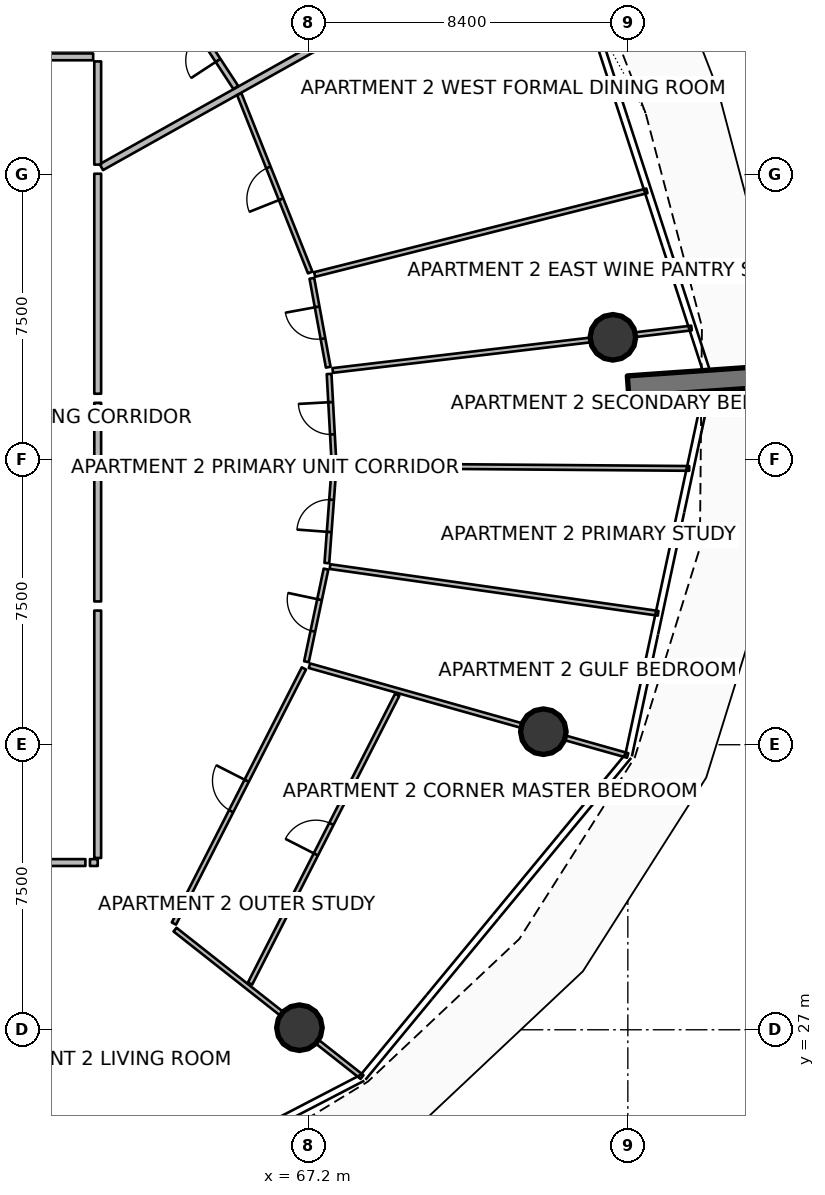
"""IFC4 building model, lengths in metres.
Left out: names, types, materials, properties, quantities, classifications, styles, units other than length and angle.
Written with IfcOpenShell. Run it as: python <this file> out.ifc"""

import sys

from ifc_helpers import new_model, si_unit, direction, frame, frame_2d, origin, origin_2d, place, context, subcontext, project, spatial, rectangle, circle, extrude, element, fill, save


model = new_model("IFC4")
c1 = context("Model", 3, precision=1e-05, world=origin(), true_north=direction((0.0, 1.0)))
c2 = subcontext(c1, "Body", "Model", "MODEL_VIEW")
j1 = project(units=[si_unit("LENGTHUNIT", "METRE"), si_unit("PLANEANGLEUNIT", "RADIAN")], contexts=[c1])
p1 = place(None, origin())
s1 = spatial("IfcSite", under=j1, at=p1, CompositionType="ELEMENT")
p2 = place(p1, origin())
s2 = spatial("IfcBuilding", under=s1, at=p2, CompositionType="ELEMENT")
p3 = place(p2, frame((0.0, 0.0, 75.15)))
s3 = spatial("IfcBuildingStorey", under=s2, at=p3, CompositionType="ELEMENT", Elevation=75.15)
p4 = place(p3, frame((75.606, 43.93, 0.0), z_axis=(0.0, 0.0, 1.0), x_axis=(0.997564163539, 0.069754853754, 0.0)))
e1 = element("IfcWall", 1, at=p4, inside=s3, PredefinedType="SOLIDWALL", context=c2, shape_type="SweptSolid", body=[
    extrude(rectangle(XDim=3.5, YDim=0.55, at=frame_2d((1.75, 0.0))), origin(), (0.0, 0.0, 1.0), 3.75),
])
for number, where, z_axis, x_axis in (
    (2, (66.958, 27.055, 0.0), (0.0, 0.0, 1.0), (1.0, 0.0, 0.0)),
    (3, (73.377, 34.843, 0.0), (0.0, 0.0, 1.0), (1.0, 0.0, 0.0)),
    (4, (75.207, 45.22, 0.0), (0.0, 0.0, 1.0), (1.0, 0.0, 0.0)),
):
    element("IfcColumn", number, at=place(p3, frame(where, z_axis=z_axis, x_axis=x_axis)), inside=s3, PredefinedType="COLUMN", context=c2, shape_type="SweptSolid", body=[
        extrude(circle(Radius=0.6, at=origin_2d()), origin(), (0.0, 0.0, 1.0), 3.5),
    ])
p5 = place(p3, frame((61.746, 49.698, 0.0), z_axis=(0.0, 0.0, 1.0), x_axis=(0.872489938668, 0.488632077256, 0.0)))
e5 = element("IfcWall", 5, at=p5, inside=s3, PredefinedType="PARTITIONING", context=c2, shape_type="SweptSolid", body=[
    extrude(rectangle(XDim=13.725, YDim=0.18, at=frame_2d((6.862, 0.0))), origin(), (0.0, 0.0, 1.0), 2.94),
])
p6 = place(p3, frame((61.65, 49.764, 0.0), z_axis=(0.0, 0.0, 1.0), x_axis=(0.0, 1.0, 0.0)))
e6 = element("IfcWall", 6, at=p6, inside=s3, PredefinedType="PARTITIONING", context=c2, shape_type="SweptSolid", body=[
    extrude(rectangle(XDim=2.716, YDim=0.18, at=frame_2d((1.358, 0.0))), origin(), (0.0, 0.0, 1.0), 2.94),
])
p7 = place(p3, frame((61.53, 52.6, 0.0), z_axis=(0.0, 0.0, 1.0), x_axis=(-1.0, 0.0, 0.0)))
e7 = element("IfcWall", 7, at=p7, inside=s3, PredefinedType="PARTITIONING", context=c2, shape_type="SweptSolid", body=[
    extrude(rectangle(XDim=5.054, YDim=0.18, at=frame_2d((2.527, 0.0))), origin(), (0.0, 0.0, 1.0), 2.94),
])
p8 = place(p3, frame((65.283, 51.794, 0.0), z_axis=(0.0, 0.0, 1.0), x_axis=(-0.547733379914, 0.836652941505, 0.0)))
e8 = element("IfcWall", 8, at=p8, inside=s3, PredefinedType="PARTITIONING", context=c2, shape_type="SweptSolid", body=[
    extrude(rectangle(XDim=2.554, YDim=0.15, at=frame_2d((1.277, 0.0))), origin(), (0.0, 0.0, 1.0), 2.94),
])
p9 = place(p8, frame((0.852, 0.0, 0.0)))
e9 = element("IfcOpeningElement", 9, at=p9, cuts=e8, PredefinedType="OPENING", context=c2, shape_type="SweptSolid", body=[
    extrude(rectangle(XDim=0.85, YDim=2.06, at=frame_2d((0.425, 1.03))), frame((0.0, 0.085, 0.0), z_axis=(0.0, -1.0, 0.0), x_axis=(1.0, 0.0, 0.0)), (0.0, 0.0, 1.0), 0.17),
])
p10 = place(p3, frame((54.056, 31.4, 0.0), z_axis=(0.0, 0.0, 1.0), x_axis=(1.0, 0.0, 0.0)))
e10 = element("IfcWall", 10, at=p10, inside=s3, PredefinedType="PARTITIONING", context=c2, shape_type="SweptSolid", body=[
    extrude(rectangle(XDim=7.27, YDim=0.18, at=frame_2d((3.635, 0.0))), origin(), (0.0, 0.0, 1.0), 2.94),
])
p11 = place(p10, frame((3.085, 0.0, 0.0)))
e11 = element("IfcOpeningElement", 11, at=p11, cuts=e10, PredefinedType="OPENING", context=c2, shape_type="SweptSolid", body=[
    extrude(rectangle(XDim=1.1, YDim=2.1, at=frame_2d((0.55, 1.05))), frame((0.0, 0.1, 0.0), z_axis=(0.0, -1.0, 0.0), x_axis=(1.0, 0.0, 0.0)), (0.0, 0.0, 1.0), 0.2),
])
p12 = place(p3, frame((61.446, 31.4, 0.0), z_axis=(0.0, 0.0, 1.0), x_axis=(1.0, 0.0, 0.0)))
e12 = element("IfcWall", 12, at=p12, inside=s3, PredefinedType="PARTITIONING", context=c2, shape_type="SweptSolid", body=[
    extrude(rectangle(XDim=0.204, YDim=0.18, at=frame_2d((0.102, 0.0))), origin(), (0.0, 0.0, 1.0), 2.94),
])
p13 = place(p3, frame((61.65, 31.52, 0.0), z_axis=(0.0, 0.0, 1.0), x_axis=(0.0, 1.0, 0.0)))
e13 = element("IfcWall", 13, at=p13, inside=s3, PredefinedType="PARTITIONING", context=c2, shape_type="SweptSolid", body=[
    extrude(rectangle(XDim=6.51, YDim=0.18, at=frame_2d((3.255, 0.0))), origin(), (0.0, 0.0, 1.0), 2.94),
])
p14 = place(p3, frame((63.684, 29.635, 0.0), z_axis=(0.0, 0.0, 1.0), x_axis=(0.785296487737, -0.619119880434, 0.0)))
e14 = element("IfcWall", 14, at=p14, inside=s3, PredefinedType="PARTITIONING", context=c2, shape_type="SweptSolid", body=[
    extrude(rectangle(XDim=6.266, YDim=0.125, at=frame_2d((3.133, 0.0))), origin(), (0.0, 0.0, 1.0), 2.94),
])
p15 = place(p3, frame((63.656, 29.795, 0.0), z_axis=(0.0, 0.0, 1.0), x_axis=(0.453993260123, 0.891005117697, 0.0)))
e15 = element("IfcWall", 15, at=p15, inside=s3, PredefinedType="PARTITIONING", context=c2, shape_type="SweptSolid", body=[
    extrude(rectangle(XDim=7.533, YDim=0.125, at=frame_2d((3.767, 0.0))), origin(), (0.0, 0.0, 1.0), 2.94),
])
p16 = place(p15, frame((3.317, 0.0, 0.0)))
e16 = element("IfcOpeningElement", 16, at=p16, cuts=e15, PredefinedType="OPENING", context=c2, shape_type="SweptSolid", body=[
    extrude(rectangle(XDim=0.9, YDim=2.08, at=frame_2d((0.45, 1.04))), frame((0.0, 0.073, 0.0), z_axis=(0.0, -1.0, 0.0), x_axis=(1.0, 0.0, 0.0)), (0.0, 0.0, 1.0), 0.145),
])
p17 = place(p3, frame((65.659, 28.216, 0.0), z_axis=(0.0, 0.0, 1.0), x_axis=(0.453990530045, 0.891006508747, 0.0)))
e17 = element("IfcWall", 17, at=p17, inside=s3, PredefinedType="PARTITIONING", context=c2, shape_type="SweptSolid", body=[
    extrude(rectangle(XDim=8.529, YDim=0.125, at=frame_2d((4.265, 0.0))), origin(), (0.0, 0.0, 1.0), 2.94),
])
p18 = place(p17, frame((3.814, 0.0, 0.0)))
e18 = element("IfcOpeningElement", 18, at=p18, cuts=e17, PredefinedType="OPENING", context=c2, shape_type="SweptSolid", body=[
    extrude(rectangle(XDim=0.9, YDim=2.08, at=frame_2d((0.45, 1.04))), frame((0.0, 0.073, 0.0), z_axis=(0.0, -1.0, 0.0), x_axis=(1.0, 0.0, 0.0)), (0.0, 0.0, 1.0), 0.145),
])
p19 = place(p3, frame((61.65, 38.27, 0.0), z_axis=(0.0, 0.0, 1.0), x_axis=(0.0, 1.0, 0.0)))
e19 = element("IfcWall", 19, at=p19, inside=s3, PredefinedType="PARTITIONING", context=c2, shape_type="SweptSolid", body=[
    extrude(rectangle(XDim=5.225, YDim=0.18, at=frame_2d((2.613, 0.0))), origin(), (0.0, 0.0, 1.0), 2.94),
])
p20 = place(p3, frame((67.222, 36.579, 0.0), z_axis=(0.0, 0.0, 1.0), x_axis=(0.962454564098, -0.271442833847, 0.0)))
e20 = element("IfcWall", 20, at=p20, inside=s3, PredefinedType="PARTITIONING", context=c2, shape_type="SweptSolid", body=[
    extrude(rectangle(XDim=8.699, YDim=0.125, at=frame_2d((4.35, 0.0))), origin(), (0.0, 0.0, 1.0), 2.94),
])
p21 = place(p3, frame((67.763, 39.187, 0.0), z_axis=(0.0, 0.0, 1.0), x_axis=(0.99002382377, -0.14090006518, 0.0)))
e21 = element("IfcWall", 21, at=p21, inside=s3, PredefinedType="PARTITIONING", context=c2, shape_type="SweptSolid", body=[
    extrude(rectangle(XDim=8.721, YDim=0.125, at=frame_2d((4.36, 0.0))), origin(), (0.0, 0.0, 1.0), 2.94),
])
p22 = place(p3, frame((67.961, 41.843, 0.0), z_axis=(0.0, 0.0, 1.0), x_axis=(0.999969091277, -0.007862346355, 0.0)))
e22 = element("IfcWall", 22, at=p22, inside=s3, PredefinedType="PARTITIONING", context=c2, shape_type="SweptSolid", body=[
    extrude(rectangle(XDim=9.253, YDim=0.125, at=frame_2d((4.627, 0.0))), origin(), (0.0, 0.0, 1.0), 2.94),
])
p23 = place(p3, frame((67.142, 36.684, 0.0), z_axis=(0.0, 0.0, 1.0), x_axis=(0.20667718161, 0.978409189757, 0.0)))
e23 = element("IfcWall", 23, at=p23, inside=s3, PredefinedType="PARTITIONING", context=c2, shape_type="SweptSolid", body=[
    extrude(rectangle(XDim=2.491, YDim=0.125, at=frame_2d((1.246, 0.0))), origin(), (0.0, 0.0, 1.0), 2.94),
])
p24 = place(p23, frame((0.821, 0.0, 0.0)))
e24 = element("IfcOpeningElement", 24, at=p24, cuts=e23, PredefinedType="OPENING", context=c2, shape_type="SweptSolid", body=[
    extrude(rectangle(XDim=0.85, YDim=2.06, at=frame_2d((0.425, 1.03))), frame((0.0, 0.073, 0.0), z_axis=(0.0, -1.0, 0.0), x_axis=(1.0, 0.0, 0.0)), (0.0, 0.0, 1.0), 0.145),
])
p25 = place(p3, frame((67.68, 39.28, 0.0), z_axis=(0.0, 0.0, 1.0), x_axis=(0.074575559496, 0.997215365869, 0.0)))
e25 = element("IfcWall", 25, at=p25, inside=s3, PredefinedType="PARTITIONING", context=c2, shape_type="SweptSolid", body=[
    extrude(rectangle(XDim=2.491, YDim=0.125, at=frame_2d((1.246, 0.0))), origin(), (0.0, 0.0, 1.0), 2.94),
])
p26 = place(p25, frame((0.821, 0.0, 0.0)))
e26 = element("IfcOpeningElement", 26, at=p26, cuts=e25, PredefinedType="OPENING", context=c2, shape_type="SweptSolid", body=[
    extrude(rectangle(XDim=0.85, YDim=2.06, at=frame_2d((0.425, 1.03))), frame((0.0, 0.073, 0.0), z_axis=(0.0, -1.0, 0.0), x_axis=(1.0, 0.0, 0.0)), (0.0, 0.0, 1.0), 0.145),
])
p27 = place(p3, frame((67.867, 41.924, 0.0), z_axis=(0.0, 0.0, 1.0), x_axis=(-0.054879482566, 0.998492985651, 0.0)))
e27 = element("IfcWall", 27, at=p27, inside=s3, PredefinedType="PARTITIONING", context=c2, shape_type="SweptSolid", body=[
    extrude(rectangle(XDim=2.335, YDim=0.125, at=frame_2d((1.168, 0.0))), origin(), (0.0, 0.0, 1.0), 2.94),
])
p28 = place(p27, frame((0.743, 0.0, 0.0)))
e28 = element("IfcOpeningElement", 28, at=p28, cuts=e27, PredefinedType="OPENING", context=c2, shape_type="SweptSolid", body=[
    extrude(rectangle(XDim=0.85, YDim=2.06, at=frame_2d((0.425, 1.03))), frame((0.0, 0.073, 0.0), z_axis=(0.0, -1.0, 0.0), x_axis=(1.0, 0.0, 0.0)), (0.0, 0.0, 1.0), 0.145),
])
p29 = place(p3, frame((61.65, 43.736, 0.0), z_axis=(0.0, 0.0, 1.0), x_axis=(0.0, 1.0, 0.0)))
e29 = element("IfcWall", 29, at=p29, inside=s3, PredefinedType="PARTITIONING", context=c2, shape_type="SweptSolid", body=[
    extrude(rectangle(XDim=5.789, YDim=0.18, at=frame_2d((2.895, 0.0))), origin(), (0.0, 0.0, 1.0), 2.94),
])
p30 = place(p3, frame((67.833, 44.347, 0.0), z_axis=(0.0, 0.0, 1.0), x_axis=(0.993068855081, 0.11753403366, 0.0)))
e30 = element("IfcWall", 30, at=p30, inside=s3, PredefinedType="PARTITIONING", context=c2, shape_type="SweptSolid", body=[
    extrude(rectangle(XDim=9.507, YDim=0.125, at=frame_2d((4.754, 0.0))), origin(), (0.0, 0.0, 1.0), 2.94),
])
p31 = place(p3, frame((67.358, 46.873, 0.0), z_axis=(0.0, 0.0, 1.0), x_axis=(0.96974940846, 0.244102611193, 0.0)))
e31 = element("IfcWall", 31, at=p31, inside=s3, PredefinedType="PARTITIONING", context=c2, shape_type="SweptSolid", body=[
    extrude(rectangle(XDim=9.016, YDim=0.125, at=frame_2d((4.508, 0.0))), origin(), (0.0, 0.0, 1.0), 2.94),
])
p32 = place(p3, frame((67.716, 44.434, 0.0), z_axis=(0.0, 0.0, 1.0), x_axis=(-0.181225149504, 0.983441632832, 0.0)))
e32 = element("IfcWall", 32, at=p32, inside=s3, PredefinedType="PARTITIONING", context=c2, shape_type="SweptSolid", body=[
    extrude(rectangle(XDim=2.378, YDim=0.125, at=frame_2d((1.189, 0.0))), origin(), (0.0, 0.0, 1.0), 2.94),
])
p33 = place(p32, frame((0.764, 0.0, 0.0)))
e33 = element("IfcOpeningElement", 33, at=p33, cuts=e32, PredefinedType="OPENING", context=c2, shape_type="SweptSolid", body=[
    extrude(rectangle(XDim=0.85, YDim=2.06, at=frame_2d((0.425, 1.03))), frame((0.0, 0.073, 0.0), z_axis=(0.0, -1.0, 0.0), x_axis=(1.0, 0.0, 0.0)), (0.0, 0.0, 1.0), 0.145),
])
p34 = place(p3, frame((67.241, 46.926, 0.0), z_axis=(0.0, 0.0, 1.0), x_axis=(-0.369580809995, 0.929198592812, 0.0)))
e34 = element("IfcWall", 34, at=p34, inside=s3, PredefinedType="PARTITIONING", context=c2, shape_type="SweptSolid", body=[
    extrude(rectangle(XDim=5.049, YDim=0.125, at=frame_2d((2.524, 0.0))), origin(), (0.0, 0.0, 1.0), 2.94),
])
p35 = place(p34, frame((2.074, 0.0, 0.0)))
e35 = element("IfcOpeningElement", 35, at=p35, cuts=e34, PredefinedType="OPENING", context=c2, shape_type="SweptSolid", body=[
    extrude(rectangle(XDim=0.9, YDim=2.08, at=frame_2d((0.45, 1.04))), frame((0.0, 0.073, 0.0), z_axis=(0.0, -1.0, 0.0), x_axis=(1.0, 0.0, 0.0)), (0.0, 0.0, 1.0), 0.145),
])
p36 = place(p9, origin())
e36 = element("IfcDoor", 36, at=p36, inside=s3, OperationType="SINGLE_SWING_LEFT", PredefinedType="DOOR", context=c2, shape_type="SweptSolid", body=[
    extrude(rectangle(XDim=0.85, YDim=2.06, at=frame_2d((0.425, 1.03))), frame((0.0, 0.025, 0.0), z_axis=(0.0, -1.0, 0.0), x_axis=(1.0, 0.0, 0.0)), (0.0, 0.0, 1.0), 0.05),
])
fill(e9, e36)
p37 = place(p16, origin())
e37 = element("IfcDoor", 37, at=p37, inside=s3, OperationType="SINGLE_SWING_RIGHT", PredefinedType="DOOR", context=c2, shape_type="SweptSolid", body=[
    extrude(rectangle(XDim=0.9, YDim=2.08, at=frame_2d((0.45, 1.04))), frame((0.0, 0.025, 0.0), z_axis=(0.0, -1.0, 0.0), x_axis=(1.0, 0.0, 0.0)), (0.0, 0.0, 1.0), 0.05),
])
fill(e16, e37)
p38 = place(p18, origin())
e38 = element("IfcDoor", 38, at=p38, inside=s3, OperationType="SINGLE_SWING_LEFT", PredefinedType="DOOR", context=c2, shape_type="SweptSolid", body=[
    extrude(rectangle(XDim=0.9, YDim=2.08, at=frame_2d((0.45, 1.04))), frame((0.0, 0.025, 0.0), z_axis=(0.0, -1.0, 0.0), x_axis=(1.0, 0.0, 0.0)), (0.0, 0.0, 1.0), 0.05),
])
fill(e18, e38)
p39 = place(p24, origin())
e39 = element("IfcDoor", 39, at=p39, inside=s3, OperationType="SINGLE_SWING_RIGHT", PredefinedType="DOOR", context=c2, shape_type="SweptSolid", body=[
    extrude(rectangle(XDim=0.85, YDim=2.06, at=frame_2d((0.425, 1.03))), frame((0.0, 0.025, 0.0), z_axis=(0.0, -1.0, 0.0), x_axis=(1.0, 0.0, 0.0)), (0.0, 0.0, 1.0), 0.05),
])
fill(e24, e39)
p40 = place(p26, origin())
e40 = element("IfcDoor", 40, at=p40, inside=s3, OperationType="SINGLE_SWING_LEFT", PredefinedType="DOOR", context=c2, shape_type="SweptSolid", body=[
    extrude(rectangle(XDim=0.85, YDim=2.06, at=frame_2d((0.425, 1.03))), frame((0.0, 0.025, 0.0), z_axis=(0.0, -1.0, 0.0), x_axis=(1.0, 0.0, 0.0)), (0.0, 0.0, 1.0), 0.05),
])
fill(e26, e40)
p41 = place(p28, origin())
e41 = element("IfcDoor", 41, at=p41, inside=s3, OperationType="SINGLE_SWING_RIGHT", PredefinedType="DOOR", context=c2, shape_type="SweptSolid", body=[
    extrude(rectangle(XDim=0.85, YDim=2.06, at=frame_2d((0.425, 1.03))), frame((0.0, 0.025, 0.0), z_axis=(0.0, -1.0, 0.0), x_axis=(1.0, 0.0, 0.0)), (0.0, 0.0, 1.0), 0.05),
])
fill(e28, e41)
p42 = place(p33, origin())
e42 = element("IfcDoor", 42, at=p42, inside=s3, OperationType="SINGLE_SWING_RIGHT", PredefinedType="DOOR", context=c2, shape_type="SweptSolid", body=[
    extrude(rectangle(XDim=0.85, YDim=2.06, at=frame_2d((0.425, 1.03))), frame((0.0, 0.025, 0.0), z_axis=(0.0, -1.0, 0.0), x_axis=(1.0, 0.0, 0.0)), (0.0, 0.0, 1.0), 0.05),
])
fill(e33, e42)
p43 = place(p35, origin())
e43 = element("IfcDoor", 43, at=p43, inside=s3, OperationType="SINGLE_SWING_LEFT", PredefinedType="DOOR", context=c2, shape_type="SweptSolid", body=[
    extrude(rectangle(XDim=0.9, YDim=2.08, at=frame_2d((0.45, 1.04))), frame((0.0, 0.025, 0.0), z_axis=(0.0, -1.0, 0.0), x_axis=(1.0, 0.0, 0.0)), (0.0, 0.0, 1.0), 0.05),
])
fill(e35, e43)
save(model, sys.argv[1])
